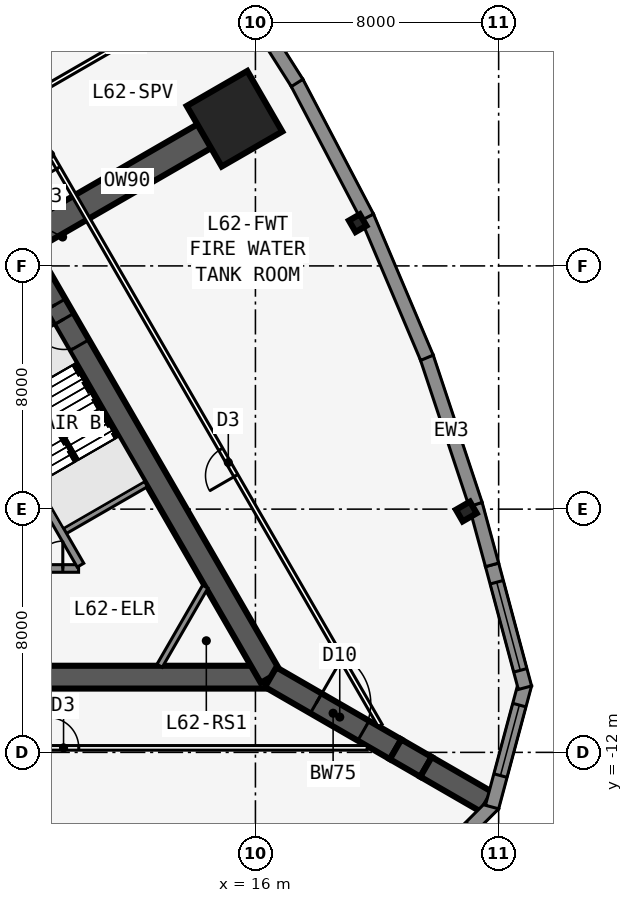
"""IFC4 building model, lengths in metres.
Left out: names, types, materials, properties, quantities, classifications, styles, units other than length and angle.
Written with IfcOpenShell. Run it as: python <this file> out.ifc"""

import sys

from ifc_helpers import new_model, si_unit, direction, frame, frame_2d, origin, origin_2d, place, context, subcontext, project, spatial, polyline, rectangle, i_section, outline, extrude, element, fill, save


model = new_model("IFC4")
c1 = context("Model", 3, precision=1e-05, world=origin(), true_north=direction((0.0, 1.0)))
c2 = subcontext(c1, "Body", "Model", "MODEL_VIEW")
j1 = project(units=[si_unit("LENGTHUNIT", "METRE"), si_unit("PLANEANGLEUNIT", "RADIAN")], contexts=[c1])
p1 = place(None, origin())
s1 = spatial("IfcSite", under=j1, at=p1, CompositionType="ELEMENT")
p2 = place(p1, origin())
s2 = spatial("IfcBuilding", under=s1, at=p2, CompositionType="ELEMENT")
p3 = place(p2, frame((0.0, 0.0, 233.3)))
s3 = spatial("IfcBuildingStorey", under=s2, at=p3, CompositionType="ELEMENT", Elevation=233.3)
p4 = place(p3, frame((0.0, -9.526, 0.0), z_axis=(0.0, 0.0, 1.0), x_axis=(1.0, 0.0, 0.0)))
e1 = element("IfcWall", 1, at=p4, inside=s3, PredefinedType="SHEAR", context=c2, shape_type="SweptSolid", body=[
    extrude(rectangle(XDim=16.5, YDim=0.75, at=frame_2d((8.25, 0.0))), origin(), (0.0, 0.0, 1.0), 6.0),
])
p5 = place(p3, frame((-0.55, -5.951, 0.0), z_axis=(0.0, 0.0, 1.0), x_axis=(1.0, 0.0, 0.0)))
e2 = element("IfcWall", 2, at=p5, inside=s3, PredefinedType="SOLIDWALL", context=c2, shape_type="SweptSolid", body=[
    extrude(rectangle(XDim=10.733, YDim=0.25, at=frame_2d((5.366, 0.0))), origin(), (0.0, 0.0, 1.0), 5.75),
])
p6 = place(p5, frame((9.314, 0.0, 0.0)))
e3 = element("IfcOpeningElement", 3, at=p6, cuts=e2, PredefinedType="OPENING", context=c2, shape_type="SweptSolid", body=[
    extrude(rectangle(XDim=0.9, YDim=2.13, at=frame_2d((0.45, 1.065))), frame((0.0, 0.135, 0.0), z_axis=(0.0, -1.0, 0.0), x_axis=(1.0, 0.0, 0.0)), (0.0, 0.0, 1.0), 0.27),
])
p7 = place(p5, frame((1.05, 0.0, 0.0)))
e4 = element("IfcOpeningElement", 4, at=p7, cuts=e2, PredefinedType="OPENING", context=c2, shape_type="SweptSolid", body=[
    extrude(rectangle(XDim=1.1, YDim=2.13, at=frame_2d((0.55, 1.065))), frame((0.0, 0.135, 0.0), z_axis=(0.0, -1.0, 0.0), x_axis=(1.0, 0.0, 0.0)), (0.0, 0.0, 1.0), 0.27),
])
p8 = place(p5, frame((4.05, 0.0, 0.0)))
e5 = element("IfcOpeningElement", 5, at=p8, cuts=e2, PredefinedType="OPENING", context=c2, shape_type="SweptSolid", body=[
    extrude(rectangle(XDim=1.1, YDim=2.13, at=frame_2d((0.55, 1.065))), frame((0.0, 0.135, 0.0), z_axis=(0.0, -1.0, 0.0), x_axis=(1.0, 0.0, 0.0)), (0.0, 0.0, 1.0), 0.27),
])
p9 = place(p3, frame((16.5, -9.526, 0.0), z_axis=(0.0, 0.0, 1.0), x_axis=(-0.499996545922, 0.866027397988, 0.0)))
e6 = element("IfcWall", 6, at=p9, inside=s3, PredefinedType="SHEAR", context=c2, shape_type="SweptSolid", body=[
    extrude(rectangle(XDim=16.5, YDim=0.75, at=frame_2d((8.25, 0.0))), origin(), (0.0, 0.0, 1.0), 6.0),
])
p10 = place(p9, frame((14.15, 0.0, 0.0)))
e7 = element("IfcOpeningElement", 7, at=p10, cuts=e6, PredefinedType="OPENING", context=c2, shape_type="SweptSolid", body=[
    extrude(rectangle(XDim=1.8, YDim=2.13, at=frame_2d((0.9, 1.065))), frame((0.0, 0.385, 0.0), z_axis=(0.0, -1.0, 0.0), x_axis=(1.0, 0.0, 0.0)), (0.0, 0.0, 1.0), 0.77),
])
p11 = place(p9, frame((12.6, 0.0, 0.0)))
e8 = element("IfcOpeningElement", 8, at=p11, cuts=e6, PredefinedType="OPENING", context=c2, shape_type="SweptSolid", body=[
    extrude(rectangle(XDim=1.0, YDim=2.13, at=frame_2d((0.5, 1.065))), frame((0.0, 0.385, 0.0), z_axis=(0.0, -1.0, 0.0), x_axis=(1.0, 0.0, 0.0)), (0.0, 0.0, 1.0), 0.77),
])
p12 = place(p3, frame((10.245, -5.843, 0.0), z_axis=(0.0, 0.0, 1.0), x_axis=(-0.499993009313, 0.866029439822, 0.0)))
e9 = element("IfcWall", 9, at=p12, inside=s3, PredefinedType="SOLIDWALL", context=c2, shape_type="SweptSolid", body=[
    extrude(rectangle(XDim=7.733, YDim=0.25, at=frame_2d((3.866, 0.0))), origin(), (0.0, 0.0, 1.0), 5.75),
])
p13 = place(p3, frame((9.629, -4.775, 0.0), z_axis=(0.0, 0.0, 1.0), x_axis=(0.866008981251, 0.500028443584, 0.0)))
e10 = element("IfcWall", 10, at=p13, inside=s3, PredefinedType="SOLIDWALL", context=c2, shape_type="SweptSolid", body=[
    extrude(rectangle(XDim=3.2, YDim=0.2, at=frame_2d((1.6, 0.0))), origin(), (0.0, 0.0, 1.0), 5.75),
])
p14 = place(p3, frame((16.5, -9.526, 0.0), z_axis=(0.0, 0.0, 1.0), x_axis=(0.866031398331, -0.499989616998, 0.0)))
e11 = element("IfcWall", 11, at=p14, inside=s3, PredefinedType="SHEAR", context=c2, shape_type="SweptSolid", body=[
    extrude(rectangle(XDim=4.746, YDim=0.75, at=frame_2d((2.373, 0.0))), origin(), (0.0, 0.0, 1.0), 6.0),
])
p15 = place(p14, frame((1.725, 0.0, 0.0)))
e12 = element("IfcOpeningElement", 12, at=p15, cuts=e11, PredefinedType="OPENING", context=c2, shape_type="SweptSolid", body=[
    extrude(rectangle(XDim=1.8, YDim=2.13, at=frame_2d((0.9, 1.065))), frame((0.0, 0.385, 0.0), z_axis=(0.0, -1.0, 0.0), x_axis=(1.0, 0.0, 0.0)), (0.0, 0.0, 1.0), 0.77),
])
p16 = place(p3, frame((20.61, -11.899, 0.0), z_axis=(0.0, 0.0, 1.0), x_axis=(0.866009537788, -0.500027479704, 0.0)))
e13 = element("IfcWall", 13, at=p16, inside=s3, PredefinedType="SHEAR", context=c2, shape_type="SweptSolid", body=[
    extrude(rectangle(XDim=1.155, YDim=0.75, at=frame_2d((0.577, 0.0))), origin(), (0.0, 0.0, 1.0), 6.0),
])
p17 = place(p3, frame((21.61, -12.477, 0.0), z_axis=(0.0, 0.0, 1.0), x_axis=(0.866055313784, -0.499948190782, 0.0)))
e14 = element("IfcWall", 14, at=p17, inside=s3, PredefinedType="SHEAR", context=c2, shape_type="SweptSolid", body=[
    extrude(rectangle(XDim=2.309, YDim=0.75, at=frame_2d((1.155, 0.0))), origin(), (0.0, 0.0, 1.0), 6.0),
])
p18 = place(p3, frame((8.25, 4.763, 0.0), z_axis=(0.0, 0.0, 1.0), x_axis=(0.866023543838, 0.500003221507, 0.0)))
e15 = element("IfcWall", 15, at=p18, inside=s3, PredefinedType="SHEAR", context=c2, shape_type="SweptSolid", body=[
    extrude(rectangle(XDim=8.154, YDim=0.9, at=frame_2d((4.077, 0.0))), origin(), (0.0, 0.0, 1.0), 6.0),
])
p19 = place(p3, frame((22.937, -4.078, 0.0), z_axis=(0.0, 0.0, 1.0), x_axis=(-0.5, 0.866025403784, 0.0)))
e16 = element("IfcColumn", 16, at=p19, inside=s3, PredefinedType="COLUMN", context=c2, shape_type="SweptSolid", body=[
    extrude(i_section(OverallWidth=0.442, OverallDepth=0.531, WebThickness=0.066, FlangeThickness=0.106, at=origin_2d()), origin(), (0.0, 0.0, 1.0), 6.0),
])
p20 = place(p3, frame((19.363, 5.406, 0.0), z_axis=(0.0, 0.0, 1.0), x_axis=(0.866025403784, 0.5, 0.0)))
e17 = element("IfcColumn", 17, at=p20, inside=s3, PredefinedType="COLUMN", context=c2, shape_type="SweptSolid", body=[
    extrude(i_section(OverallWidth=0.411, OverallDepth=0.434, WebThickness=0.036, FlangeThickness=0.057, at=origin_2d()), origin(), (0.0, 0.0, 1.0), 6.0),
])
p21 = place(p3, frame((15.312, 8.84, 0.0), z_axis=(0.0, 0.0, 1.0), x_axis=(0.866025403784, 0.5, 0.0)))
e18 = element("IfcColumn", 18, at=p21, inside=s3, PredefinedType="COLUMN", context=c2, shape_type="SweptSolid", body=[
    extrude(rectangle(XDim=2.3, YDim=2.3, at=origin_2d()), origin(), (0.0, 0.0, 1.0), 6.0),
])
p22 = place(p3, frame((20.882, -16.656, 0.0), z_axis=(0.0, 0.0, 1.0), x_axis=(0.707077605902, 0.707135955267, 0.0)))
e19 = element("IfcWall", 19, at=p22, inside=s3, PredefinedType="SOLIDWALL", context=c2, shape_type="SweptSolid", body=[
    extrude(outline(polyline([(4.184, 0.225), (4.125, 0.225), (3.705, 0.113), (3.675, 0.225), (0.0, 0.225), (0.0, -0.225), (4.184, -0.225), (4.184, 0.225)])), origin(), (0.0, 0.0, 1.0), 5.75),
])
p23 = place(p22, frame((0.713, 0.0, 0.9)))
e20 = element("IfcOpeningElement", 20, at=p23, cuts=e19, PredefinedType="OPENING", context=c2, shape_type="SweptSolid", body=[
    extrude(rectangle(XDim=2.4, YDim=3.6, at=frame_2d((1.2, 1.8))), frame((0.0, 0.235, 0.0), z_axis=(0.0, -1.0, 0.0), x_axis=(1.0, 0.0, 0.0)), (0.0, 0.0, 1.0), 0.47),
])
p24 = place(p3, frame((23.783, -13.798, 0.0), z_axis=(0.0, 0.0, 1.0), x_axis=(0.258799282522, 0.96593112144, 0.0)))
e21 = element("IfcWall", 21, at=p24, inside=s3, PredefinedType="SOLIDWALL", context=c2, shape_type="SweptSolid", body=[
    extrude(outline(polyline([(4.184, 0.225), (0.509, 0.225), (0.479, 0.113), (0.059, 0.225), (0.0, 0.225), (0.0, -0.225), (4.184, -0.225), (4.184, 0.225)])), origin(), (0.0, 0.0, 1.0), 5.75),
])
p25 = place(p24, frame((1.071, 0.0, 0.9)))
e22 = element("IfcOpeningElement", 22, at=p25, cuts=e21, PredefinedType="OPENING", context=c2, shape_type="SweptSolid", body=[
    extrude(rectangle(XDim=2.4, YDim=3.6, at=frame_2d((1.2, 1.8))), frame((0.0, 0.235, 0.0), z_axis=(0.0, -1.0, 0.0), x_axis=(1.0, 0.0, 0.0)), (0.0, 0.0, 1.0), 0.47),
])
p26 = place(p3, frame((24.865, -9.873, 0.0), z_axis=(0.0, 0.0, 1.0), x_axis=(-0.258784695888, 0.965935029479, 0.0)))
e23 = element("IfcWall", 23, at=p26, inside=s3, PredefinedType="SOLIDWALL", context=c2, shape_type="SweptSolid", body=[
    extrude(rectangle(XDim=4.184, YDim=0.45, at=frame_2d((2.092, 0.0))), origin(), (0.0, 0.0, 1.0), 5.75),
])
p27 = place(p26, frame((0.592, 0.0, 0.9)))
e24 = element("IfcOpeningElement", 24, at=p27, cuts=e23, PredefinedType="OPENING", context=c2, shape_type="SweptSolid", body=[
    extrude(rectangle(XDim=3.0, YDim=3.6, at=frame_2d((1.5, 1.8))), frame((0.0, 0.235, 0.0), z_axis=(0.0, -1.0, 0.0), x_axis=(1.0, 0.0, 0.0)), (0.0, 0.0, 1.0), 0.47),
])
p28 = place(p3, frame((23.783, -5.833, 0.0), z_axis=(0.0, 0.0, 1.0), x_axis=(-0.262867703986, 0.964831887015, 0.0)))
e25 = element("IfcWall", 25, at=p28, inside=s3, PredefinedType="SOLIDWALL", context=c2, shape_type="SweptSolid", body=[
    extrude(rectangle(XDim=2.068, YDim=0.45, at=frame_2d((1.034, 0.0))), origin(), (0.0, 0.0, 1.0), 5.75),
])
p29 = place(p3, frame((23.243, -3.849, 0.0), z_axis=(0.0, 0.0, 1.0), x_axis=(-0.315065402268, 0.949069961749, 0.0)))
e26 = element("IfcWall", 26, at=p29, inside=s3, PredefinedType="SOLIDWALL", context=c2, shape_type="SweptSolid", body=[
    extrude(outline(polyline([(0.0, 0.0), (5.105, 0.0), (5.105, 5.75), (0.0, 5.75), (0.0, 0.0)]), holes=[polyline([(4.502, 2.875), (4.436, 3.38), (4.241, 3.85), (3.931, 4.254), (3.527, 4.564), (3.057, 4.759), (2.552, 4.825), (2.048, 4.759), (1.577, 4.564), (1.174, 4.254), (0.864, 3.85), (0.669, 3.38), (0.602, 2.875), (0.669, 2.37), (0.864, 1.9), (1.174, 1.496), (1.577, 1.186), (2.048, 0.991), (2.552, 0.925), (3.057, 0.991), (3.527, 1.186), (3.931, 1.496), (4.241, 1.9), (4.436, 2.37), (4.502, 2.875)])]), frame((0.0, 0.225, 0.0), z_axis=(0.0, -1.0, 0.0), x_axis=(1.0, 0.0, 0.0)), (0.0, 0.0, 1.0), 0.45),
])
p30 = place(p3, frame((21.641, 0.979, 0.0), z_axis=(0.0, 0.0, 1.0), x_axis=(-0.390038319149, 0.920798625974, 0.0)))
e27 = element("IfcWall", 27, at=p30, inside=s3, PredefinedType="SOLIDWALL", context=c2, shape_type="SweptSolid", body=[
    extrude(outline(polyline([(0.0, 0.0), (5.038, 0.0), (5.038, 5.75), (0.0, 5.75), (0.0, 0.0)]), holes=[polyline([(4.419, 2.875), (4.354, 3.367), (4.165, 3.825), (3.863, 4.219), (3.469, 4.52), (3.011, 4.71), (2.519, 4.775), (2.027, 4.71), (1.569, 4.52), (1.176, 4.219), (0.874, 3.825), (0.684, 3.367), (0.619, 2.875), (0.684, 2.383), (0.874, 1.925), (1.176, 1.531), (1.569, 1.229), (2.027, 1.04), (2.519, 0.975), (3.011, 1.04), (3.469, 1.229), (3.863, 1.531), (4.165, 1.925), (4.354, 2.383), (4.419, 2.875)])]), frame((0.0, 0.225, 0.0), z_axis=(0.0, -1.0, 0.0), x_axis=(1.0, 0.0, 0.0)), (0.0, 0.0, 1.0), 0.45),
])
p31 = place(p3, frame((19.684, 5.602, 0.0), z_axis=(0.0, 0.0, 1.0), x_axis=(-0.463976002579, 0.885847768542, 0.0)))
e28 = element("IfcWall", 28, at=p31, inside=s3, PredefinedType="SOLIDWALL", context=c2, shape_type="SweptSolid", body=[
    extrude(outline(polyline([(0.0, 0.0), (5.004, 0.0), (5.004, 5.75), (0.0, 5.75), (0.0, 0.0)]), holes=[polyline([(4.402, 2.875), (4.337, 3.367), (4.147, 3.825), (3.846, 4.219), (3.452, 4.52), (2.994, 4.71), (2.502, 4.775), (2.01, 4.71), (1.552, 4.52), (1.159, 4.219), (0.857, 3.825), (0.667, 3.367), (0.602, 2.875), (0.667, 2.383), (0.857, 1.925), (1.159, 1.531), (1.552, 1.229), (2.01, 1.04), (2.502, 0.975), (2.994, 1.04), (3.452, 1.229), (3.846, 1.531), (4.147, 1.925), (4.337, 2.383), (4.402, 2.875)])]), frame((0.0, 0.225, 0.0), z_axis=(0.0, -1.0, 0.0), x_axis=(1.0, 0.0, 0.0)), (0.0, 0.0, 1.0), 0.45),
])
p32 = place(p3, frame((17.371, 10.019, 0.0), z_axis=(0.0, 0.0, 1.0), x_axis=(-0.535242418236, 0.844698498709, 0.0)))
e29 = element("IfcWall", 29, at=p32, inside=s3, PredefinedType="SOLIDWALL", context=c2, shape_type="SweptSolid", body=[
    extrude(outline(polyline([(0.0, 0.0), (5.004, 0.0), (5.004, 5.75), (0.0, 5.75), (0.0, 0.0)]), holes=[polyline([(4.402, 2.875), (4.337, 3.367), (4.148, 3.825), (3.846, 4.219), (3.452, 4.52), (2.994, 4.71), (2.502, 4.775), (2.01, 4.71), (1.552, 4.52), (1.159, 4.219), (0.857, 3.825), (0.667, 3.367), (0.602, 2.875), (0.667, 2.383), (0.857, 1.925), (1.159, 1.531), (1.552, 1.229), (2.01, 1.04), (2.502, 0.975), (2.994, 1.04), (3.452, 1.229), (3.846, 1.531), (4.148, 1.925), (4.337, 2.383), (4.402, 2.875)])]), frame((0.0, 0.225, 0.0), z_axis=(0.0, -1.0, 0.0), x_axis=(1.0, 0.0, 0.0)), (0.0, 0.0, 1.0), 0.45),
])
p33 = place(p3, frame((-19.677, -11.851, 0.0), z_axis=(0.0, 0.0, 1.0), x_axis=(1.0, 0.0, 0.0)))
e30 = element("IfcWall", 30, at=p33, inside=s3, PredefinedType="PARTITIONING", context=c2, shape_type="SweptSolid", body=[
    extrude(rectangle(XDim=39.354, YDim=0.15, at=frame_2d((19.677, 0.0))), origin(), (0.0, 0.0, 1.0), 5.75),
])
p34 = place(p33, frame((6.489, 0.0, 0.0)))
e31 = element("IfcOpeningElement", 31, at=p34, cuts=e30, PredefinedType="OPENING", context=c2, shape_type="SweptSolid", body=[
    extrude(rectangle(XDim=1.0, YDim=2.13, at=frame_2d((0.5, 1.065))), frame((0.0, 0.085, 0.0), z_axis=(0.0, -1.0, 0.0), x_axis=(1.0, 0.0, 0.0)), (0.0, 0.0, 1.0), 0.17),
])
p35 = place(p33, frame((16.177, 0.0, 0.0)))
e32 = element("IfcOpeningElement", 32, at=p35, cuts=e30, PredefinedType="OPENING", context=c2, shape_type="SweptSolid", body=[
    extrude(rectangle(XDim=1.0, YDim=2.13, at=frame_2d((0.5, 1.065))), frame((0.0, 0.085, 0.0), z_axis=(0.0, -1.0, 0.0), x_axis=(1.0, 0.0, 0.0)), (0.0, 0.0, 1.0), 0.17),
])
p36 = place(p33, frame((28.865, 0.0, 0.0)))
e33 = element("IfcOpeningElement", 33, at=p36, cuts=e30, PredefinedType="OPENING", context=c2, shape_type="SweptSolid", body=[
    extrude(rectangle(XDim=1.0, YDim=2.13, at=frame_2d((0.5, 1.065))), frame((0.0, 0.085, 0.0), z_axis=(0.0, -1.0, 0.0), x_axis=(1.0, 0.0, 0.0)), (0.0, 0.0, 1.0), 0.17),
])
p37 = place(p3, frame((20.102, -11.115, 0.0), z_axis=(0.0, 0.0, 1.0), x_axis=(-0.500000265775, 0.866025250339, 0.0)))
e34 = element("IfcWall", 34, at=p37, inside=s3, PredefinedType="PARTITIONING", context=c2, shape_type="SweptSolid", body=[
    extrude(rectangle(XDim=39.354, YDim=0.15, at=frame_2d((19.677, 0.0))), origin(), (0.0, 0.0, 1.0), 5.75),
])
p38 = place(p37, frame((9.489, 0.0, 0.0)))
e35 = element("IfcOpeningElement", 35, at=p38, cuts=e34, PredefinedType="OPENING", context=c2, shape_type="SweptSolid", body=[
    extrude(rectangle(XDim=1.0, YDim=2.13, at=frame_2d((0.5, 1.065))), frame((0.0, 0.085, 0.0), z_axis=(0.0, -1.0, 0.0), x_axis=(1.0, 0.0, 0.0)), (0.0, 0.0, 1.0), 0.17),
])
p39 = place(p37, frame((21.177, 0.0, 0.0)))
e36 = element("IfcOpeningElement", 36, at=p39, cuts=e34, PredefinedType="OPENING", context=c2, shape_type="SweptSolid", body=[
    extrude(rectangle(XDim=1.0, YDim=2.13, at=frame_2d((0.5, 1.065))), frame((0.0, 0.085, 0.0), z_axis=(0.0, -1.0, 0.0), x_axis=(1.0, 0.0, 0.0)), (0.0, 0.0, 1.0), 0.17),
])
p40 = place(p37, frame((30.865, 0.0, 0.0)))
e37 = element("IfcOpeningElement", 37, at=p40, cuts=e34, PredefinedType="OPENING", context=c2, shape_type="SweptSolid", body=[
    extrude(rectangle(XDim=1.0, YDim=2.13, at=frame_2d((0.5, 1.065))), frame((0.0, 0.085, 0.0), z_axis=(0.0, -1.0, 0.0), x_axis=(1.0, 0.0, 0.0)), (0.0, 0.0, 1.0), 0.17),
])
p41 = place(p3, frame((8.329, 9.427, 0.0), z_axis=(0.0, 0.0, 1.0), x_axis=(0.866027296944, 0.499996720937, 0.0)))
e38 = element("IfcWall", 38, at=p41, inside=s3, PredefinedType="PARTITIONING", context=c2, shape_type="SweptSolid", body=[
    extrude(rectangle(XDim=7.937, YDim=0.15, at=frame_2d((3.968, 0.0))), origin(), (0.0, 0.0, 1.0), 5.75),
])
p42 = place(p3, frame((14.349, -6.551, 0.0), z_axis=(0.0, 0.0, 1.0), x_axis=(-0.499952404951, -0.866052881055, 0.0)))
e39 = element("IfcWall", 39, at=p42, inside=s3, PredefinedType="SOLIDWALL", context=c2, shape_type="SweptSolid", body=[
    extrude(rectangle(XDim=3.002, YDim=0.2, at=frame_2d((1.501, 0.0))), origin(), (0.0, 0.0, 1.0), 5.75),
])
p43 = place(p3, frame((10.135, -2.401, 0.0), z_axis=(0.0, 0.0, 1.0), x_axis=(-0.499992232847, 0.866029888106, 0.0)))
e40 = element("IfcWall", 40, at=p43, inside=s3, PredefinedType="SOLIDWALL", context=c2, shape_type="SweptSolid", body=[
    extrude(rectangle(XDim=2.794, YDim=0.1, at=frame_2d((1.397, 0.0))), origin(), (0.0, 0.0, 1.0), 6.0),
])
p44 = place(p25, origin())
e41 = element("IfcWindow", 41, at=p44, inside=s3, PartitioningType="SINGLE_PANEL", PredefinedType="WINDOW", context=c2, shape_type="SweptSolid", body=[
    extrude(rectangle(XDim=2.4, YDim=3.6, at=frame_2d((1.2, 1.8))), frame((0.0, 0.03, 0.0), z_axis=(0.0, -1.0, 0.0), x_axis=(1.0, 0.0, 0.0)), (0.0, 0.0, 1.0), 0.06),
])
fill(e22, e41)
p45 = place(p27, origin())
e42 = element("IfcWindow", 42, at=p45, inside=s3, PartitioningType="SINGLE_PANEL", PredefinedType="WINDOW", context=c2, shape_type="SweptSolid", body=[
    extrude(rectangle(XDim=3.0, YDim=3.6, at=frame_2d((1.5, 1.8))), frame((0.0, 0.03, 0.0), z_axis=(0.0, -1.0, 0.0), x_axis=(1.0, 0.0, 0.0)), (0.0, 0.0, 1.0), 0.06),
])
fill(e24, e42)
p46 = place(p36, origin())
e43 = element("IfcDoor", 43, at=p46, inside=s3, OperationType="SINGLE_SWING_LEFT", PredefinedType="DOOR", context=c2, shape_type="SweptSolid", body=[
    extrude(rectangle(XDim=1.0, YDim=2.13, at=frame_2d((0.5, 1.065))), frame((0.0, 0.025, 0.0), z_axis=(0.0, -1.0, 0.0), x_axis=(1.0, 0.0, 0.0)), (0.0, 0.0, 1.0), 0.05),
])
fill(e33, e43)
p47 = place(p38, origin())
e44 = element("IfcDoor", 44, at=p47, inside=s3, OperationType="SINGLE_SWING_LEFT", PredefinedType="DOOR", context=c2, shape_type="SweptSolid", body=[
    extrude(rectangle(XDim=1.0, YDim=2.13, at=frame_2d((0.5, 1.065))), frame((0.0, 0.025, 0.0), z_axis=(0.0, -1.0, 0.0), x_axis=(1.0, 0.0, 0.0)), (0.0, 0.0, 1.0), 0.05),
])
fill(e35, e44)
p48 = place(p39, origin())
e45 = element("IfcDoor", 45, at=p48, inside=s3, OperationType="SINGLE_SWING_LEFT", PredefinedType="DOOR", context=c2, shape_type="SweptSolid", body=[
    extrude(rectangle(XDim=1.0, YDim=2.13, at=frame_2d((0.5, 1.065))), frame((0.0, 0.025, 0.0), z_axis=(0.0, -1.0, 0.0), x_axis=(1.0, 0.0, 0.0)), (0.0, 0.0, 1.0), 0.05),
])
fill(e36, e45)
p49 = place(p10, origin())
e46 = element("IfcDoor", 46, at=p49, inside=s3, OperationType="DOUBLE_DOOR_SINGLE_SWING", PredefinedType="DOOR", context=c2, shape_type="SweptSolid", body=[
    extrude(rectangle(XDim=1.8, YDim=2.13, at=frame_2d((0.9, 1.065))), frame((0.0, 0.025, 0.0), z_axis=(0.0, -1.0, 0.0), x_axis=(1.0, 0.0, 0.0)), (0.0, 0.0, 1.0), 0.05),
])
fill(e7, e46)
p50 = place(p11, origin())
e47 = element("IfcDoor", 47, at=p50, inside=s3, OperationType="SINGLE_SWING_RIGHT", PredefinedType="DOOR", context=c2, shape_type="SweptSolid", body=[
    extrude(rectangle(XDim=1.0, YDim=2.13, at=frame_2d((0.5, 1.065))), frame((0.0, 0.025, 0.0), z_axis=(0.0, -1.0, 0.0), x_axis=(1.0, 0.0, 0.0)), (0.0, 0.0, 1.0), 0.05),
])
fill(e8, e47)
p51 = place(p15, origin())
e48 = element("IfcDoor", 48, at=p51, inside=s3, OperationType="DOUBLE_DOOR_DOUBLE_SWING", PredefinedType="DOOR", context=c2, shape_type="SweptSolid", body=[
    extrude(rectangle(XDim=1.8, YDim=2.13, at=frame_2d((0.9, 1.065))), frame((0.0, 0.025, 0.0), z_axis=(0.0, -1.0, 0.0), x_axis=(1.0, 0.0, 0.0)), (0.0, 0.0, 1.0), 0.05),
])
fill(e12, e48)
p52 = place(p6, origin())
e49 = element("IfcDoor", 49, at=p52, inside=s3, OperationType="SINGLE_SWING_RIGHT", PredefinedType="DOOR", context=c2, shape_type="SweptSolid", body=[
    extrude(rectangle(XDim=0.9, YDim=2.13, at=frame_2d((0.45, 1.065))), frame((0.0, 0.025, 0.0), z_axis=(0.0, -1.0, 0.0), x_axis=(1.0, 0.0, 0.0)), (0.0, 0.0, 1.0), 0.05),
])
fill(e3, e49)
save(model, sys.argv[1])
